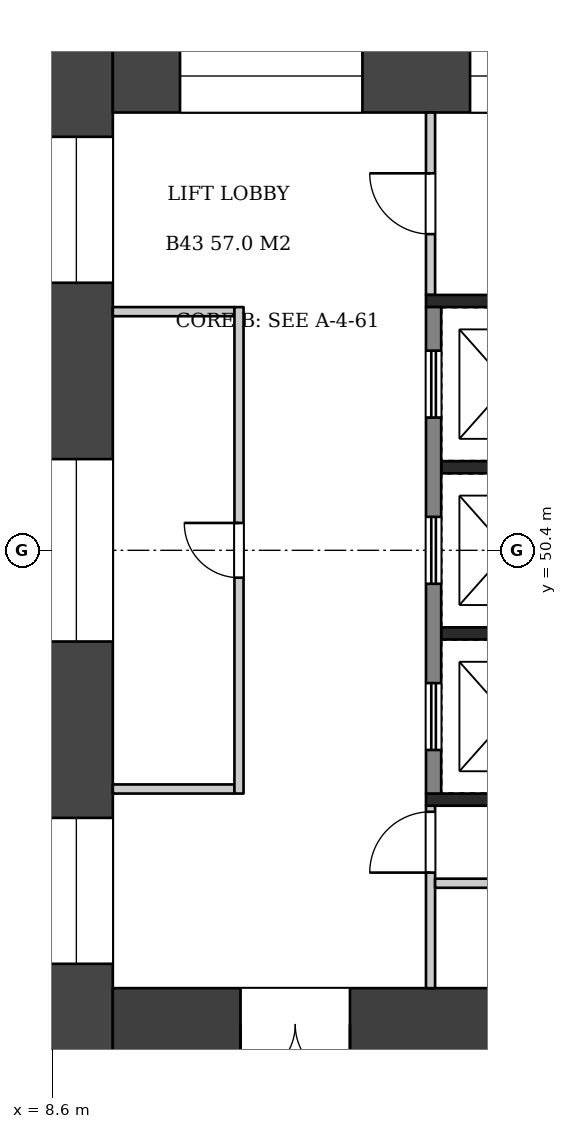
"""IFC4 building model, lengths in metres.
Left out: names, types, materials, properties, quantities, classifications, styles, units other than length and angle.
Written with IfcOpenShell. Run it as: python <this file> out.ifc"""

import sys

from ifc_helpers import new_model, si_unit, direction, frame, frame_2d, origin, place, context, subcontext, project, spatial, rectangle, extrude, element, fill, save


model = new_model("IFC4")
c1 = context("Model", 3, precision=1e-05, world=origin(), true_north=direction((0.0, 1.0)))
c2 = subcontext(c1, "Body", "Model", "MODEL_VIEW")
j1 = project(units=[si_unit("LENGTHUNIT", "METRE"), si_unit("PLANEANGLEUNIT", "RADIAN")], contexts=[c1])
p1 = place(None, origin())
s1 = spatial("IfcSite", under=j1, at=p1, CompositionType="ELEMENT")
p2 = place(p1, origin())
s2 = spatial("IfcBuilding", under=s1, at=p2, CompositionType="ELEMENT")
p3 = place(p2, frame((0.0, 0.0, 168.7)))
s3 = spatial("IfcBuildingStorey", under=s2, at=p3, CompositionType="ELEMENT", Elevation=168.7)
p4 = place(p3, frame((9.0, 58.8, 0.0), z_axis=(0.0, 0.0, 1.0), x_axis=(0.0, -1.0, 0.0)))
e1 = element("IfcWall", 1, at=p4, inside=s3, PredefinedType="SHEAR", context=c2, shape_type="SweptSolid", body=[
    extrude(rectangle(XDim=16.8, YDim=1.2, at=frame_2d((8.4, 0.0))), origin(), (0.0, 0.0, 1.0), 3.22),
])
p5 = place(p4, frame((1.6, 0.0, 0.6)))
e2 = element("IfcOpeningElement", 2, at=p5, cuts=e1, PredefinedType="OPENING", context=c2, shape_type="SweptSolid", body=[
    extrude(rectangle(XDim=2.4, YDim=2.1, at=frame_2d((1.2, 1.05))), frame((0.0, 0.61, 0.0), z_axis=(0.0, -1.0, 0.0), x_axis=(1.0, 0.0, 0.0)), (0.0, 0.0, 1.0), 1.22),
])
p6 = place(p4, frame((6.9, 0.0, 1.6)))
e3 = element("IfcOpeningElement", 3, at=p6, cuts=e1, PredefinedType="OPENING", context=c2, shape_type="SweptSolid", body=[
    extrude(rectangle(XDim=3.0, YDim=1.2, at=frame_2d((1.5, 0.6))), frame((0.0, 0.61, 0.0), z_axis=(0.0, -1.0, 0.0), x_axis=(1.0, 0.0, 0.0)), (0.0, 0.0, 1.0), 1.22),
])
p7 = place(p4, frame((12.8, 0.0, 0.6)))
e4 = element("IfcOpeningElement", 4, at=p7, cuts=e1, PredefinedType="OPENING", context=c2, shape_type="SweptSolid", body=[
    extrude(rectangle(XDim=2.4, YDim=2.1, at=frame_2d((1.2, 1.05))), frame((0.0, 0.61, 0.0), z_axis=(0.0, -1.0, 0.0), x_axis=(1.0, 0.0, 0.0)), (0.0, 0.0, 1.0), 1.22),
])
p8 = place(p3, frame((9.6, 58.2, 0.0), z_axis=(0.0, 0.0, 1.0), x_axis=(1.0, 0.0, 0.0)))
e5 = element("IfcWall", 5, at=p8, inside=s3, PredefinedType="SHEAR", context=c2, shape_type="SweptSolid", body=[
    extrude(rectangle(XDim=14.4, YDim=1.2, at=frame_2d((7.2, 0.0))), origin(), (0.0, 0.0, 1.0), 3.22),
])
p9 = place(p8, frame((1.105, 0.0, 0.6)))
e6 = element("IfcOpeningElement", 6, at=p9, cuts=e5, PredefinedType="OPENING", context=c2, shape_type="SweptSolid", body=[
    extrude(rectangle(XDim=3.0, YDim=2.1, at=frame_2d((1.5, 1.05))), frame((0.0, 0.61, 0.0), z_axis=(0.0, -1.0, 0.0), x_axis=(1.0, 0.0, 0.0)), (0.0, 0.0, 1.0), 1.22),
])
p10 = place(p8, frame((5.875, 0.0, 0.6)))
e7 = element("IfcOpeningElement", 7, at=p10, cuts=e5, PredefinedType="OPENING", context=c2, shape_type="SweptSolid", body=[
    extrude(rectangle(XDim=2.4, YDim=2.1, at=frame_2d((1.2, 1.05))), frame((0.0, 0.61, 0.0), z_axis=(0.0, -1.0, 0.0), x_axis=(1.0, 0.0, 0.0)), (0.0, 0.0, 1.0), 1.22),
])
p11 = place(p8, frame((9.993, 0.0, 0.5)))
e8 = element("IfcOpeningElement", 8, at=p11, cuts=e5, PredefinedType="OPENING", context=c2, shape_type="SweptSolid", body=[
    extrude(rectangle(XDim=1.2, YDim=2.4, at=frame_2d((0.6, 1.2))), frame((0.0, 0.61, 0.0), z_axis=(0.0, -1.0, 0.0), x_axis=(1.0, 0.0, 0.0)), (0.0, 0.0, 1.0), 1.22),
])
p12 = place(p8, frame((12.197, 0.0, 0.5)))
e9 = element("IfcOpeningElement", 9, at=p12, cuts=e5, PredefinedType="OPENING", context=c2, shape_type="SweptSolid", body=[
    extrude(rectangle(XDim=1.2, YDim=2.4, at=frame_2d((0.6, 1.2))), frame((0.0, 0.61, 0.0), z_axis=(0.0, -1.0, 0.0), x_axis=(1.0, 0.0, 0.0)), (0.0, 0.0, 1.0), 1.22),
])
p13 = place(p3, frame((9.6, 42.6, 0.0), z_axis=(0.0, 0.0, 1.0), x_axis=(1.0, 0.0, 0.0)))
e10 = element("IfcWall", 10, at=p13, inside=s3, PredefinedType="SHEAR", context=c2, shape_type="SweptSolid", body=[
    extrude(rectangle(XDim=14.4, YDim=1.2, at=frame_2d((7.2, 0.0))), origin(), (0.0, 0.0, 1.0), 3.22),
])
p14 = place(p13, frame((2.1, 0.0, 0.0)))
e11 = element("IfcOpeningElement", 11, at=p14, cuts=e10, PredefinedType="OPENING", context=c2, shape_type="SweptSolid", body=[
    extrude(rectangle(XDim=1.8, YDim=2.1, at=frame_2d((0.9, 1.05))), frame((0.0, 0.61, 0.0), z_axis=(0.0, -1.0, 0.0), x_axis=(1.0, 0.0, 0.0)), (0.0, 0.0, 1.0), 1.22),
])
for number, where, z_axis, x_axis in (
    (12, (9.6, 54.325, 0.0), (0.0, 0.0, 1.0), (1.0, 0.0, 0.0)),
    (13, (9.6, 46.475, 0.0), (0.0, 0.0, 1.0), (1.0, 0.0, 0.0)),
):
    element("IfcWall", number, at=place(p3, frame(where, z_axis=z_axis, x_axis=x_axis)), inside=s3, PredefinedType="PARTITIONING", context=c2, shape_type="SweptSolid", body=[
        extrude(rectangle(XDim=2.0, YDim=0.15, at=frame_2d((1.0, 0.0))), origin(), (0.0, 0.0, 1.0), 3.22),
    ])
p15 = place(p3, frame((11.675, 54.4, 0.0), z_axis=(0.0, 0.0, 1.0), x_axis=(0.0, -1.0, 0.0)))
e14 = element("IfcWall", 14, at=p15, inside=s3, PredefinedType="PARTITIONING", context=c2, shape_type="SweptSolid", body=[
    extrude(rectangle(XDim=8.0, YDim=0.15, at=frame_2d((4.0, 0.0))), origin(), (0.0, 0.0, 1.0), 3.22),
])
p16 = place(p15, frame((3.55, 0.0, 0.0)))
e15 = element("IfcOpeningElement", 15, at=p16, cuts=e14, PredefinedType="OPENING", context=c2, shape_type="SweptSolid", body=[
    extrude(rectangle(XDim=0.9, YDim=2.1, at=frame_2d((0.45, 1.05))), frame((0.0, 0.085, 0.0), z_axis=(0.0, -1.0, 0.0), x_axis=(1.0, 0.0, 0.0)), (0.0, 0.0, 1.0), 0.17),
])
for number, where, z_axis, x_axis in (
    (16, (15.0, 51.767, 0.0), (0.0, 0.0, 1.0), (1.0, 0.0, 0.0)),
    (17, (15.0, 49.033, 0.0), (0.0, 0.0, 1.0), (1.0, 0.0, 0.0)),
):
    element("IfcWall", number, at=place(p3, frame(where, z_axis=z_axis, x_axis=x_axis)), inside=s3, PredefinedType="SHEAR", context=c2, shape_type="SweptSolid", body=[
        extrude(rectangle(XDim=1.9, YDim=0.2, at=frame_2d((0.95, 0.0))), origin(), (0.0, 0.0, 1.0), 3.22),
    ])
p17 = place(p3, frame((14.875, 54.4, 0.0), z_axis=(0.0, 0.0, 1.0), x_axis=(0.0, -1.0, 0.0)))
e18 = element("IfcWall", 18, at=p17, inside=s3, PredefinedType="SHEAR", context=c2, shape_type="SweptSolid", body=[
    extrude(rectangle(XDim=8.0, YDim=0.25, at=frame_2d((4.0, 0.0))), origin(), (0.0, 0.0, 1.0), 3.22),
])
p18 = place(p17, frame((0.717, 0.0, 0.0)))
e19 = element("IfcOpeningElement", 19, at=p18, cuts=e18, PredefinedType="OPENING", context=c2, shape_type="SweptSolid", body=[
    extrude(rectangle(XDim=1.1, YDim=2.1, at=frame_2d((0.55, 1.05))), frame((0.0, 0.135, 0.0), z_axis=(0.0, -1.0, 0.0), x_axis=(1.0, 0.0, 0.0)), (0.0, 0.0, 1.0), 0.27),
])
p19 = place(p17, frame((3.45, 0.0, 0.0)))
e20 = element("IfcOpeningElement", 20, at=p19, cuts=e18, PredefinedType="OPENING", context=c2, shape_type="SweptSolid", body=[
    extrude(rectangle(XDim=1.1, YDim=2.1, at=frame_2d((0.55, 1.05))), frame((0.0, 0.135, 0.0), z_axis=(0.0, -1.0, 0.0), x_axis=(1.0, 0.0, 0.0)), (0.0, 0.0, 1.0), 0.27),
])
p20 = place(p17, frame((6.183, 0.0, 0.0)))
e21 = element("IfcOpeningElement", 21, at=p20, cuts=e18, PredefinedType="OPENING", context=c2, shape_type="SweptSolid", body=[
    extrude(rectangle(XDim=1.1, YDim=2.1, at=frame_2d((0.55, 1.05))), frame((0.0, 0.135, 0.0), z_axis=(0.0, -1.0, 0.0), x_axis=(1.0, 0.0, 0.0)), (0.0, 0.0, 1.0), 0.27),
])
p21 = place(p3, frame((14.75, 54.5, 0.0), z_axis=(0.0, 0.0, 1.0), x_axis=(1.0, 0.0, 0.0)))
e22 = element("IfcWall", 22, at=p21, inside=s3, PredefinedType="SHEAR", context=c2, shape_type="SweptSolid", body=[
    extrude(rectangle(XDim=2.4, YDim=0.2, at=frame_2d((1.2, 0.0))), origin(), (0.0, 0.0, 1.0), 3.22),
])
p22 = place(p3, frame((14.825, 57.6, 0.0), z_axis=(0.0, 0.0, 1.0), x_axis=(0.0, -1.0, 0.0)))
e23 = element("IfcWall", 23, at=p22, inside=s3, PredefinedType="PARTITIONING", context=c2, shape_type="SweptSolid", body=[
    extrude(rectangle(XDim=3.0, YDim=0.15, at=frame_2d((1.5, 0.0))), origin(), (0.0, 0.0, 1.0), 3.22),
])
p23 = place(p22, frame((1.0, 0.0, 0.0)))
e24 = element("IfcOpeningElement", 24, at=p23, cuts=e23, PredefinedType="OPENING", context=c2, shape_type="SweptSolid", body=[
    extrude(rectangle(XDim=1.0, YDim=2.1, at=frame_2d((0.5, 1.05))), frame((0.0, 0.085, 0.0), z_axis=(0.0, -1.0, 0.0), x_axis=(1.0, 0.0, 0.0)), (0.0, 0.0, 1.0), 0.17),
])
p24 = place(p3, frame((14.75, 46.3, 0.0), z_axis=(0.0, 0.0, 1.0), x_axis=(1.0, 0.0, 0.0)))
e25 = element("IfcWall", 25, at=p24, inside=s3, PredefinedType="SHEAR", context=c2, shape_type="SweptSolid", body=[
    extrude(rectangle(XDim=9.25, YDim=0.2, at=frame_2d((4.625, 0.0))), origin(), (0.0, 0.0, 1.0), 3.22),
])
p25 = place(p3, frame((14.825, 46.2, 0.0), z_axis=(0.0, 0.0, 1.0), x_axis=(0.0, -1.0, 0.0)))
e26 = element("IfcWall", 26, at=p25, inside=s3, PredefinedType="PARTITIONING", context=c2, shape_type="SweptSolid", body=[
    extrude(rectangle(XDim=3.0, YDim=0.15, at=frame_2d((1.5, 0.0))), origin(), (0.0, 0.0, 1.0), 3.22),
])
p26 = place(p25, frame((0.1, 0.0, 0.0)))
e27 = element("IfcOpeningElement", 27, at=p26, cuts=e26, PredefinedType="OPENING", context=c2, shape_type="SweptSolid", body=[
    extrude(rectangle(XDim=1.0, YDim=2.1, at=frame_2d((0.5, 1.05))), frame((0.0, 0.085, 0.0), z_axis=(0.0, -1.0, 0.0), x_axis=(1.0, 0.0, 0.0)), (0.0, 0.0, 1.0), 0.17),
])
p27 = place(p3, frame((14.9, 44.925, 0.0), z_axis=(0.0, 0.0, 1.0), x_axis=(1.0, 0.0, 0.0)))
e28 = element("IfcWall", 28, at=p27, inside=s3, PredefinedType="PARTITIONING", context=c2, shape_type="SweptSolid", body=[
    extrude(rectangle(XDim=9.1, YDim=0.15, at=frame_2d((4.55, 0.0))), origin(), (0.0, 0.0, 1.0), 3.22),
])
p28 = place(p27, frame((4.1, 0.0, 0.0)))
e29 = element("IfcOpeningElement", 29, at=p28, cuts=e28, PredefinedType="OPENING", context=c2, shape_type="SweptSolid", body=[
    extrude(rectangle(XDim=0.9, YDim=2.1, at=frame_2d((0.45, 1.05))), frame((0.0, 0.085, 0.0), z_axis=(0.0, -1.0, 0.0), x_axis=(1.0, 0.0, 0.0)), (0.0, 0.0, 1.0), 0.17),
])
p29 = place(p14, frame((1.8, 0.0, 0.0), z_axis=(0.0, 0.0, 1.0), x_axis=(-1.0, 0.0, 0.0)))
e30 = element("IfcDoor", 30, at=p29, inside=s3, OperationType="DOUBLE_DOOR_SINGLE_SWING", PredefinedType="DOOR", context=c2, shape_type="SweptSolid", body=[
    extrude(rectangle(XDim=1.8, YDim=2.1, at=frame_2d((0.9, 1.05))), frame((0.0, 0.025, 0.0), z_axis=(0.0, -1.0, 0.0), x_axis=(1.0, 0.0, 0.0)), (0.0, 0.0, 1.0), 0.05),
])
fill(e11, e30)
p30 = place(p16, frame((0.9, 0.0, 0.0), z_axis=(0.0, 0.0, 1.0), x_axis=(-1.0, 0.0, 0.0)))
e31 = element("IfcDoor", 31, at=p30, inside=s3, OperationType="SINGLE_SWING_RIGHT", PredefinedType="DOOR", context=c2, shape_type="SweptSolid", body=[
    extrude(rectangle(XDim=0.9, YDim=2.1, at=frame_2d((0.45, 1.05))), frame((0.0, 0.025, 0.0), z_axis=(0.0, -1.0, 0.0), x_axis=(1.0, 0.0, 0.0)), (0.0, 0.0, 1.0), 0.05),
])
fill(e15, e31)
p31 = place(p18, origin())
e32 = element("IfcDoor", 32, at=p31, inside=s3, OperationType="DOUBLE_DOOR_SLIDING", PredefinedType="DOOR", context=c2, shape_type="SweptSolid", body=[
    extrude(rectangle(XDim=1.1, YDim=2.1, at=frame_2d((0.55, 1.05))), frame((0.0, 0.025, 0.0), z_axis=(0.0, -1.0, 0.0), x_axis=(1.0, 0.0, 0.0)), (0.0, 0.0, 1.0), 0.05),
])
fill(e19, e32)
p32 = place(p19, origin())
e33 = element("IfcDoor", 33, at=p32, inside=s3, OperationType="DOUBLE_DOOR_SLIDING", PredefinedType="DOOR", context=c2, shape_type="SweptSolid", body=[
    extrude(rectangle(XDim=1.1, YDim=2.1, at=frame_2d((0.55, 1.05))), frame((0.0, 0.025, 0.0), z_axis=(0.0, -1.0, 0.0), x_axis=(1.0, 0.0, 0.0)), (0.0, 0.0, 1.0), 0.05),
])
fill(e20, e33)
p33 = place(p20, origin())
e34 = element("IfcDoor", 34, at=p33, inside=s3, OperationType="DOUBLE_DOOR_SLIDING", PredefinedType="DOOR", context=c2, shape_type="SweptSolid", body=[
    extrude(rectangle(XDim=1.1, YDim=2.1, at=frame_2d((0.55, 1.05))), frame((0.0, 0.025, 0.0), z_axis=(0.0, -1.0, 0.0), x_axis=(1.0, 0.0, 0.0)), (0.0, 0.0, 1.0), 0.05),
])
fill(e21, e34)
p34 = place(p23, frame((1.0, 0.0, 0.0), z_axis=(0.0, 0.0, 1.0), x_axis=(-1.0, 0.0, 0.0)))
e35 = element("IfcDoor", 35, at=p34, inside=s3, OperationType="SINGLE_SWING_RIGHT", PredefinedType="DOOR", context=c2, shape_type="SweptSolid", body=[
    extrude(rectangle(XDim=1.0, YDim=2.1, at=frame_2d((0.5, 1.05))), frame((0.0, 0.025, 0.0), z_axis=(0.0, -1.0, 0.0), x_axis=(1.0, 0.0, 0.0)), (0.0, 0.0, 1.0), 0.05),
])
fill(e24, e35)
p35 = place(p26, frame((1.0, 0.0, 0.0), z_axis=(0.0, 0.0, 1.0), x_axis=(-1.0, 0.0, 0.0)))
e36 = element("IfcDoor", 36, at=p35, inside=s3, OperationType="SINGLE_SWING_LEFT", PredefinedType="DOOR", context=c2, shape_type="SweptSolid", body=[
    extrude(rectangle(XDim=1.0, YDim=2.1, at=frame_2d((0.5, 1.05))), frame((0.0, 0.025, 0.0), z_axis=(0.0, -1.0, 0.0), x_axis=(1.0, 0.0, 0.0)), (0.0, 0.0, 1.0), 0.05),
])
fill(e27, e36)
p36 = place(p5, origin())
e37 = element("IfcWindow", 37, at=p36, inside=s3, PartitioningType="SINGLE_PANEL", PredefinedType="WINDOW", context=c2, shape_type="SweptSolid", body=[
    extrude(rectangle(XDim=2.4, YDim=2.1, at=frame_2d((1.2, 1.05))), frame((0.0, 0.03, 0.0), z_axis=(0.0, -1.0, 0.0), x_axis=(1.0, 0.0, 0.0)), (0.0, 0.0, 1.0), 0.06),
])
fill(e2, e37)
p37 = place(p6, origin())
e38 = element("IfcWindow", 38, at=p37, inside=s3, PartitioningType="SINGLE_PANEL", PredefinedType="WINDOW", context=c2, shape_type="SweptSolid", body=[
    extrude(rectangle(XDim=3.0, YDim=1.2, at=frame_2d((1.5, 0.6))), frame((0.0, 0.03, 0.0), z_axis=(0.0, -1.0, 0.0), x_axis=(1.0, 0.0, 0.0)), (0.0, 0.0, 1.0), 0.06),
])
fill(e3, e38)
p38 = place(p7, origin())
e39 = element("IfcWindow", 39, at=p38, inside=s3, PartitioningType="SINGLE_PANEL", PredefinedType="WINDOW", context=c2, shape_type="SweptSolid", body=[
    extrude(rectangle(XDim=2.4, YDim=2.1, at=frame_2d((1.2, 1.05))), frame((0.0, 0.03, 0.0), z_axis=(0.0, -1.0, 0.0), x_axis=(1.0, 0.0, 0.0)), (0.0, 0.0, 1.0), 0.06),
])
fill(e4, e39)
p39 = place(p9, origin())
e40 = element("IfcWindow", 40, at=p39, inside=s3, PartitioningType="SINGLE_PANEL", PredefinedType="WINDOW", context=c2, shape_type="SweptSolid", body=[
    extrude(rectangle(XDim=3.0, YDim=2.1, at=frame_2d((1.5, 1.05))), frame((0.0, 0.03, 0.0), z_axis=(0.0, -1.0, 0.0), x_axis=(1.0, 0.0, 0.0)), (0.0, 0.0, 1.0), 0.06),
])
fill(e6, e40)
p40 = place(p10, origin())
e41 = element("IfcWindow", 41, at=p40, inside=s3, PartitioningType="SINGLE_PANEL", PredefinedType="WINDOW", context=c2, shape_type="SweptSolid", body=[
    extrude(rectangle(XDim=2.4, YDim=2.1, at=frame_2d((1.2, 1.05))), frame((0.0, 0.03, 0.0), z_axis=(0.0, -1.0, 0.0), x_axis=(1.0, 0.0, 0.0)), (0.0, 0.0, 1.0), 0.06),
])
fill(e7, e41)
save(model, sys.argv[1])
